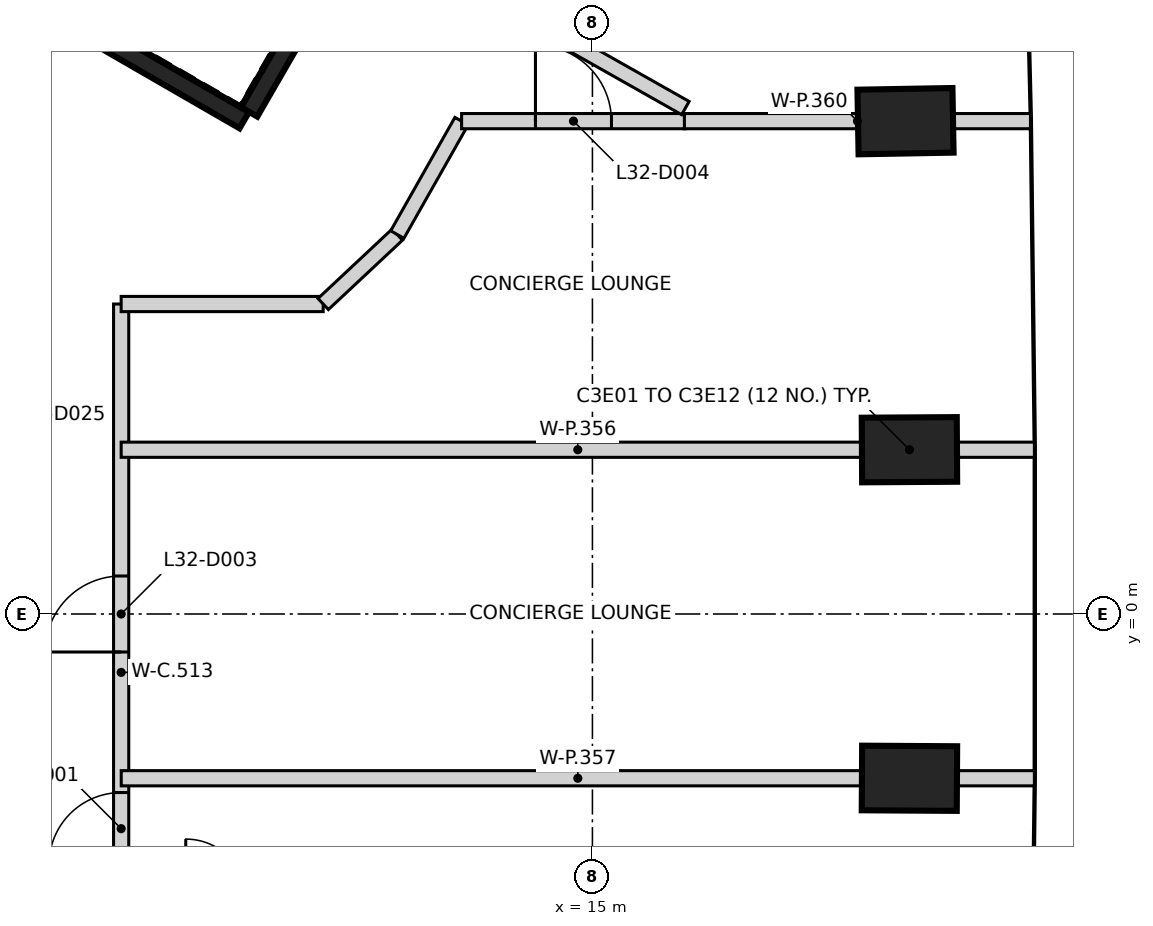
"""IFC4 building model, lengths in metres.
Left out: names, types, materials, properties, quantities, classifications, styles, units other than length and angle.
Written with IfcOpenShell. Run it as: python <this file> out.ifc"""

import sys

from ifc_helpers import new_model, si_unit, direction, frame, frame_2d, origin, origin_2d, place, context, subcontext, project, spatial, rectangle, extrude, element, fill, save


model = new_model("IFC4")
c1 = context("Model", 3, precision=1e-05, world=origin(), true_north=direction((0.0, 1.0)))
c2 = subcontext(c1, "Body", "Model", "MODEL_VIEW")
j1 = project(units=[si_unit("LENGTHUNIT", "METRE"), si_unit("PLANEANGLEUNIT", "RADIAN")], contexts=[c1])
p1 = place(None, origin())
s1 = spatial("IfcSite", under=j1, at=p1, CompositionType="ELEMENT")
p2 = place(p1, origin())
s2 = spatial("IfcBuilding", under=s1, at=p2, CompositionType="ELEMENT")
p3 = place(p2, frame((0.0, 0.0, 132.4)))
s3 = spatial("IfcBuildingStorey", under=s2, at=p3, CompositionType="ELEMENT", Elevation=132.4)
for number, where, z_axis, x_axis in (
    (1, (19.171, -2.161, -0.4), (0.0, 0.0, 1.0), (-1.0, 0.006, 0.0)),
    (2, (19.171, 2.161, -0.4), (0.0, 0.0, 1.0), (1.0, 0.006, 0.0)),
    (3, (19.119, 6.484, -0.4), (0.0, 0.0, 1.0), (1.0, 0.018, 0.0)),
):
    element("IfcColumn", number, at=place(p3, frame(where, z_axis=z_axis, x_axis=x_axis)), inside=s3, PredefinedType="COLUMN", context=c2, shape_type="SweptSolid", body=[
        extrude(rectangle(XDim=1.25, YDim=0.85, at=origin_2d()), origin(), (0.0, 0.0, 1.0), 3.6),
    ])
p4 = place(p3, frame((10.42, 6.498, 0.0), z_axis=(0.0, 0.0, 1.0), x_axis=(-0.866021906294, 0.500006057782, 0.0)))
e4 = element("IfcWall", 4, at=p4, inside=s3, PredefinedType="SHEAR", context=c2, shape_type="SweptSolid", body=[
    extrude(rectangle(XDim=11.55, YDim=0.25, at=frame_2d((5.775, 0.0))), origin(), (0.0, 0.0, 1.0), 3.2),
])
p5 = place(p4, frame((10.025, 0.0, 0.0)))
e5 = element("IfcOpeningElement", 5, at=p5, cuts=e4, PredefinedType="OPENING", context=c2, shape_type="SweptSolid", body=[
    extrude(rectangle(XDim=1.2, YDim=2.1, at=frame_2d((0.6, 1.05))), frame((0.0, 0.135, 0.0), z_axis=(0.0, -1.0, 0.0), x_axis=(1.0, 0.0, 0.0)), (0.0, 0.0, 1.0), 0.27),
])
p6 = place(p4, frame((8.725, 0.0, 0.0)))
e6 = element("IfcOpeningElement", 6, at=p6, cuts=e4, PredefinedType="OPENING", context=c2, shape_type="SweptSolid", body=[
    extrude(rectangle(XDim=1.2, YDim=2.1, at=frame_2d((0.6, 1.05))), frame((0.0, 0.135, 0.0), z_axis=(0.0, -1.0, 0.0), x_axis=(1.0, 0.0, 0.0)), (0.0, 0.0, 1.0), 0.27),
])
p7 = place(p3, frame((13.238, 11.378, 0.0), z_axis=(0.0, 0.0, 1.0), x_axis=(-0.500008851346, -0.866020293397, 0.0)))
e7 = element("IfcWall", 7, at=p7, inside=s3, PredefinedType="SHEAR", context=c2, shape_type="SweptSolid", body=[
    extrude(rectangle(XDim=5.51, YDim=0.25, at=frame_2d((2.755, 0.0))), origin(), (0.0, 0.0, 1.0), 3.2),
])
p8 = place(p3, frame((8.8, -5.614, 0.0), z_axis=(0.0, 0.0, 1.0), x_axis=(0.0, 1.0, 0.0)))
e8 = element("IfcWall", 8, at=p8, inside=s3, PredefinedType="PARTITIONING", context=c2, shape_type="SweptSolid", body=[
    extrude(rectangle(XDim=9.692, YDim=0.2, at=frame_2d((4.846, 0.0))), origin(), (0.0, 0.0, 1.0), 3.2),
])
p9 = place(p8, frame((2.315, 0.0, 0.0)))
e9 = element("IfcOpeningElement", 9, at=p9, cuts=e8, PredefinedType="OPENING", context=c2, shape_type="SweptSolid", body=[
    extrude(rectangle(XDim=0.95, YDim=2.1, at=frame_2d((0.475, 1.05))), frame((0.0, 0.11, 0.0), z_axis=(0.0, -1.0, 0.0), x_axis=(1.0, 0.0, 0.0)), (0.0, 0.0, 1.0), 0.22),
])
p10 = place(p8, frame((5.114, 0.0, 0.0)))
e10 = element("IfcOpeningElement", 10, at=p10, cuts=e8, PredefinedType="OPENING", context=c2, shape_type="SweptSolid", body=[
    extrude(rectangle(XDim=1.0, YDim=2.1, at=frame_2d((0.5, 1.05))), frame((0.0, 0.11, 0.0), z_axis=(0.0, -1.0, 0.0), x_axis=(1.0, 0.0, 0.0)), (0.0, 0.0, 1.0), 0.22),
])
p11 = place(p3, frame((8.8, 4.078, 0.0), z_axis=(0.0, 0.0, 1.0), x_axis=(1.0, 0.0, 0.0)))
e11 = element("IfcWall", 11, at=p11, inside=s3, PredefinedType="PARTITIONING", context=c2, shape_type="SweptSolid", body=[
    extrude(rectangle(XDim=2.658, YDim=0.2, at=frame_2d((1.329, 0.0))), origin(), (0.0, 0.0, 1.0), 3.2),
])
p12 = place(p3, frame((11.458, 4.078, 0.0), z_axis=(0.0, 0.0, 1.0), x_axis=(0.729936032318, 0.683515463412, 0.0)))
e12 = element("IfcWall", 12, at=p12, inside=s3, PredefinedType="PARTITIONING", context=c2, shape_type="SweptSolid", body=[
    extrude(rectangle(XDim=1.336, YDim=0.2, at=frame_2d((0.668, 0.0))), origin(), (0.0, 0.0, 1.0), 3.2),
])
p13 = place(p3, frame((12.433, 4.992, 0.0), z_axis=(0.0, 0.0, 1.0), x_axis=(0.492807777065, 0.870138204462, 0.0)))
e13 = element("IfcWall", 13, at=p13, inside=s3, PredefinedType="PARTITIONING", context=c2, shape_type="SweptSolid", body=[
    extrude(rectangle(XDim=1.715, YDim=0.2, at=frame_2d((0.857, 0.0))), origin(), (0.0, 0.0, 1.0), 3.2),
])
p14 = place(p3, frame((13.279, 6.484, 0.0), z_axis=(0.0, 0.0, 1.0), x_axis=(1.0, 0.0, 0.0)))
e14 = element("IfcWall", 14, at=p14, inside=s3, PredefinedType="PARTITIONING", context=c2, shape_type="SweptSolid", body=[
    extrude(rectangle(XDim=2.943, YDim=0.2, at=frame_2d((1.471, 0.0))), origin(), (0.0, 0.0, 1.0), 3.2),
])
p15 = place(p14, frame((0.971, 0.0, 0.0)))
e15 = element("IfcOpeningElement", 15, at=p15, cuts=e14, PredefinedType="OPENING", context=c2, shape_type="SweptSolid", body=[
    extrude(rectangle(XDim=1.0, YDim=2.1, at=frame_2d((0.5, 1.05))), frame((0.0, 0.11, 0.0), z_axis=(0.0, -1.0, 0.0), x_axis=(1.0, 0.0, 0.0)), (0.0, 0.0, 1.0), 0.22),
])
p16 = place(p3, frame((14.066, 7.876, 0.0), z_axis=(0.0, 0.0, 1.0), x_axis=(0.870423351516, -0.492303960105, 0.0)))
e16 = element("IfcWall", 16, at=p16, inside=s3, PredefinedType="PARTITIONING", context=c2, shape_type="SweptSolid", body=[
    extrude(rectangle(XDim=2.478, YDim=0.2, at=frame_2d((1.239, 0.0))), origin(), (0.0, 0.0, 1.0), 3.2),
])
p17 = place(p3, frame((8.8, 2.161, 0.0), z_axis=(0.0, 0.0, 1.0), x_axis=(1.0, 0.0, 0.0)))
e17 = element("IfcWall", 17, at=p17, inside=s3, PredefinedType="PARTITIONING", context=c2, shape_type="SweptSolid", body=[
    extrude(rectangle(XDim=12.015, YDim=0.2, at=frame_2d((6.007, 0.0))), origin(), (0.0, 0.0, 1.0), 3.2),
])
p18 = place(p3, frame((8.801, -2.161, 0.0), z_axis=(0.0, 0.0, 1.0), x_axis=(1.0, 0.0, 0.0)))
e18 = element("IfcWall", 18, at=p18, inside=s3, PredefinedType="PARTITIONING", context=c2, shape_type="SweptSolid", body=[
    extrude(rectangle(XDim=12.014, YDim=0.2, at=frame_2d((6.007, 0.0))), origin(), (0.0, 0.0, 1.0), 3.2),
])
p19 = place(p3, frame((16.21, 6.484, 0.0), z_axis=(0.0, 0.0, 1.0), x_axis=(1.0, 0.0, 0.0)))
e19 = element("IfcWall", 19, at=p19, inside=s3, PredefinedType="PARTITIONING", context=c2, shape_type="SweptSolid", body=[
    extrude(rectangle(XDim=4.553, YDim=0.2, at=frame_2d((2.277, 0.0))), origin(), (0.0, 0.0, 1.0), 3.2),
])
p20 = place(p9, frame((0.95, 0.0, 0.0), z_axis=(0.0, 0.0, 1.0), x_axis=(-1.0, 0.0, 0.0)))
e20 = element("IfcDoor", 20, at=p20, inside=s3, OperationType="SINGLE_SWING_LEFT", PredefinedType="DOOR", context=c2, shape_type="SweptSolid", body=[
    extrude(rectangle(XDim=0.95, YDim=2.1, at=frame_2d((0.475, 1.05))), frame((0.0, 0.025, 0.0), z_axis=(0.0, -1.0, 0.0), x_axis=(1.0, 0.0, 0.0)), (0.0, 0.0, 1.0), 0.05),
])
fill(e9, e20)
p21 = place(p10, frame((1.0, 0.0, 0.0), z_axis=(0.0, 0.0, 1.0), x_axis=(-1.0, 0.0, 0.0)))
e21 = element("IfcDoor", 21, at=p21, inside=s3, OperationType="SINGLE_SWING_LEFT", PredefinedType="DOOR", context=c2, shape_type="SweptSolid", body=[
    extrude(rectangle(XDim=1.0, YDim=2.1, at=frame_2d((0.5, 1.05))), frame((0.0, 0.025, 0.0), z_axis=(0.0, -1.0, 0.0), x_axis=(1.0, 0.0, 0.0)), (0.0, 0.0, 1.0), 0.05),
])
fill(e10, e21)
p22 = place(p15, frame((1.0, 0.0, 0.0), z_axis=(0.0, 0.0, 1.0), x_axis=(-1.0, 0.0, 0.0)))
e22 = element("IfcDoor", 22, at=p22, inside=s3, OperationType="SINGLE_SWING_LEFT", PredefinedType="DOOR", context=c2, shape_type="SweptSolid", body=[
    extrude(rectangle(XDim=1.0, YDim=2.1, at=frame_2d((0.5, 1.05))), frame((0.0, 0.025, 0.0), z_axis=(0.0, -1.0, 0.0), x_axis=(1.0, 0.0, 0.0)), (0.0, 0.0, 1.0), 0.05),
])
fill(e15, e22)
save(model, sys.argv[1])
